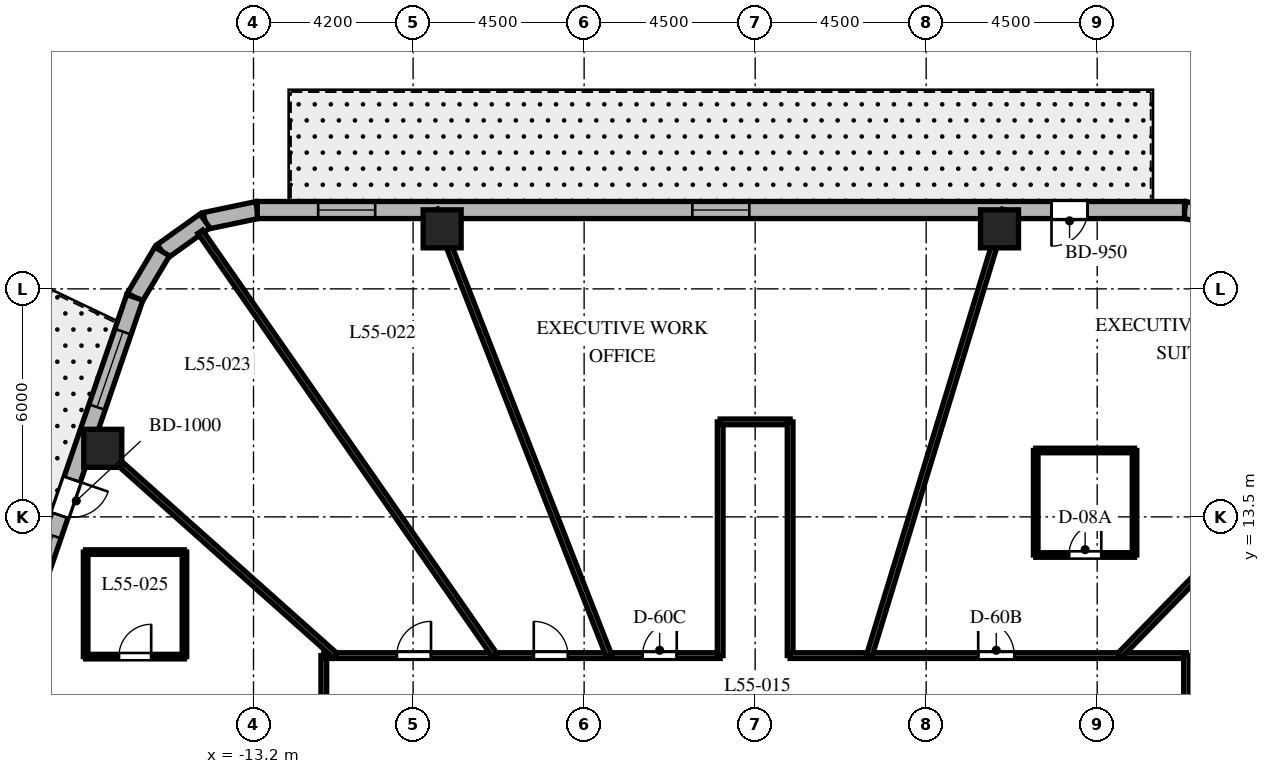
"""IFC4 building model, lengths in metres.
Left out: names, types, materials, properties, quantities, classifications, styles, units other than length and angle.
Written with IfcOpenShell. Run it as: python <this file> out.ifc"""

import sys

from ifc_helpers import new_model, si_unit, direction, frame, frame_2d, origin, origin_2d, place, context, subcontext, project, spatial, rectangle, extrude, element, fill, save


model = new_model("IFC4")
c1 = context("Model", 3, precision=1e-05, world=origin(), true_north=direction((0.0, 1.0)))
c2 = subcontext(c1, "Body", "Model", "MODEL_VIEW")
j1 = project(units=[si_unit("LENGTHUNIT", "METRE"), si_unit("PLANEANGLEUNIT", "RADIAN")], contexts=[c1])
p1 = place(None, origin())
s1 = spatial("IfcSite", under=j1, at=p1, CompositionType="ELEMENT")
p2 = place(p1, origin())
s2 = spatial("IfcBuilding", under=s1, at=p2, CompositionType="ELEMENT")
p3 = place(p2, frame((0.0, 0.0, 221.7)))
s3 = spatial("IfcBuildingStorey", under=s2, at=p3, CompositionType="ELEMENT", Elevation=221.7)
for number, where, z_axis, x_axis in (
    (1, (6.43, 21.08, 0.0), (0.0, 0.0, 1.0), (1.0, 0.0, 0.0)),
    (2, (-8.236, 21.08, 0.0), (0.0, 0.0, 1.0), (1.0, 0.0, 0.0)),
    (3, (-17.166, 15.304, 0.0), (0.0, 0.0, 1.0), (1.0, 0.0, 0.0)),
):
    element("IfcColumn", number, at=place(p3, frame(where, z_axis=z_axis, x_axis=x_axis)), inside=s3, PredefinedType="COLUMN", context=c2, shape_type="SweptSolid", body=[
        extrude(rectangle(XDim=1.0, YDim=1.0, at=origin_2d()), origin(), (0.0, 0.0, 1.0), 3.8),
    ])
p4 = place(p3, frame((12.546, 21.34, 0.0), z_axis=(0.0, 0.0, 1.0), x_axis=(-0.982686750835, 0.18527479519, 0.0)))
e4 = element("IfcWall", 4, at=p4, inside=s3, PredefinedType="SOLIDWALL", context=c2, shape_type="SweptSolid", body=[
    extrude(rectangle(XDim=1.27, YDim=0.45, at=frame_2d((0.635, 0.0))), origin(), (0.0, 0.0, 1.0), 3.5),
])
p5 = place(p3, frame((-13.102, 21.575, 0.0), z_axis=(0.0, 0.0, 1.0), x_axis=(-0.978757421505, -0.205021730188, 0.0)))
e5 = element("IfcWall", 5, at=p5, inside=s3, PredefinedType="SOLIDWALL", context=c2, shape_type="SweptSolid", body=[
    extrude(rectangle(XDim=1.406, YDim=0.45, at=frame_2d((0.703, 0.0))), origin(), (0.0, 0.0, 1.0), 3.5),
])
p6 = place(p3, frame((-14.478, 21.287, 0.0), z_axis=(0.0, 0.0, 1.0), x_axis=(-0.813888518617, -0.58102106611, 0.0)))
e6 = element("IfcWall", 6, at=p6, inside=s3, PredefinedType="SOLIDWALL", context=c2, shape_type="SweptSolid", body=[
    extrude(rectangle(XDim=1.383, YDim=0.45, at=frame_2d((0.691, 0.0))), origin(), (0.0, 0.0, 1.0), 3.5),
])
p7 = place(p3, frame((-15.604, 20.483, 0.0), z_axis=(0.0, 0.0, 1.0), x_axis=(-0.512222149036, -0.858852996756, 0.0)))
e7 = element("IfcWall", 7, at=p7, inside=s3, PredefinedType="SOLIDWALL", context=c2, shape_type="SweptSolid", body=[
    extrude(rectangle(XDim=1.406, YDim=0.45, at=frame_2d((0.703, 0.0))), origin(), (0.0, 0.0, 1.0), 3.5),
])
p8 = place(p3, frame((11.298, 21.575, 0.0), z_axis=(0.0, 0.0, 1.0), x_axis=(-1.0, 0.0, 0.0)))
e8 = element("IfcWall", 8, at=p8, inside=s3, PredefinedType="SOLIDWALL", context=c2, shape_type="SweptSolid", body=[
    extrude(rectangle(XDim=24.399, YDim=0.45, at=frame_2d((12.2, 0.0))), origin(), (0.0, 0.0, 1.0), 3.5),
])
p9 = place(p8, frame((2.55, 0.0, 0.0)))
e9 = element("IfcOpeningElement", 9, at=p9, cuts=e8, PredefinedType="OPENING", context=c2, shape_type="SweptSolid", body=[
    extrude(rectangle(XDim=0.95, YDim=2.15, at=frame_2d((0.475, 1.075))), frame((0.0, 0.235, 0.0), z_axis=(0.0, -1.0, 0.0), x_axis=(1.0, 0.0, 0.0)), (0.0, 0.0, 1.0), 0.47),
])
p10 = place(p8, frame((11.451, 0.0, 0.8)))
e10 = element("IfcOpeningElement", 10, at=p10, cuts=e8, PredefinedType="OPENING", context=c2, shape_type="SweptSolid", body=[
    extrude(rectangle(XDim=1.5, YDim=1.8, at=frame_2d((0.75, 0.9))), frame((0.0, 0.235, 0.0), z_axis=(0.0, -1.0, 0.0), x_axis=(1.0, 0.0, 0.0)), (0.0, 0.0, 1.0), 0.47),
])
p11 = place(p8, frame((21.296, 0.0, 0.8)))
e11 = element("IfcOpeningElement", 11, at=p11, cuts=e8, PredefinedType="OPENING", context=c2, shape_type="SweptSolid", body=[
    extrude(rectangle(XDim=1.5, YDim=1.8, at=frame_2d((0.75, 0.9))), frame((0.0, 0.235, 0.0), z_axis=(0.0, -1.0, 0.0), x_axis=(1.0, 0.0, 0.0)), (0.0, 0.0, 1.0), 0.47),
])
p12 = place(p3, frame((-16.324, 19.275, 0.0), z_axis=(0.0, 0.0, 1.0), x_axis=(-0.325083142304, -0.945685439557, 0.0)))
e12 = element("IfcWall", 12, at=p12, inside=s3, PredefinedType="SOLIDWALL", context=c2, shape_type="SweptSolid", body=[
    extrude(rectangle(XDim=20.224, YDim=0.45, at=frame_2d((10.112, 0.0))), origin(), (0.0, 0.0, 1.0), 3.5),
])
p13 = place(p12, frame((5.062, 0.0, 0.0)))
e13 = element("IfcOpeningElement", 13, at=p13, cuts=e12, PredefinedType="OPENING", context=c2, shape_type="SweptSolid", body=[
    extrude(rectangle(XDim=1.0, YDim=2.15, at=frame_2d((0.5, 1.075))), frame((0.0, 0.235, 0.0), z_axis=(0.0, -1.0, 0.0), x_axis=(1.0, 0.0, 0.0)), (0.0, 0.0, 1.0), 0.47),
])
p14 = place(p12, frame((0.953, 0.0, 0.8)))
e14 = element("IfcOpeningElement", 14, at=p14, cuts=e12, PredefinedType="OPENING", context=c2, shape_type="SweptSolid", body=[
    extrude(rectangle(XDim=2.1, YDim=1.85, at=frame_2d((1.05, 0.925))), frame((0.0, 0.235, 0.0), z_axis=(0.0, -1.0, 0.0), x_axis=(1.0, 0.0, 0.0)), (0.0, 0.0, 1.0), 0.47),
])
p15 = place(p12, frame((6.629, 0.0, 0.8)))
e15 = element("IfcOpeningElement", 15, at=p15, cuts=e12, PredefinedType="OPENING", context=c2, shape_type="SweptSolid", body=[
    extrude(rectangle(XDim=2.1, YDim=1.85, at=frame_2d((1.05, 0.925))), frame((0.0, 0.235, 0.0), z_axis=(0.0, -1.0, 0.0), x_axis=(1.0, 0.0, 0.0)), (0.0, 0.0, 1.0), 0.47),
])
p16 = place(p12, frame((12.312, 0.0, 0.8)))
e16 = element("IfcOpeningElement", 16, at=p16, cuts=e12, PredefinedType="OPENING", context=c2, shape_type="SweptSolid", body=[
    extrude(rectangle(XDim=2.1, YDim=1.85, at=frame_2d((1.05, 0.925))), frame((0.0, 0.235, 0.0), z_axis=(0.0, -1.0, 0.0), x_axis=(1.0, 0.0, 0.0)), (0.0, 0.0, 1.0), 0.47),
])
p17 = place(p12, frame((17.118, 0.0, 0.8)))
e17 = element("IfcOpeningElement", 17, at=p17, cuts=e12, PredefinedType="OPENING", context=c2, shape_type="SweptSolid", body=[
    extrude(rectangle(XDim=2.1, YDim=1.85, at=frame_2d((1.05, 0.925))), frame((0.0, 0.235, 0.0), z_axis=(0.0, -1.0, 0.0), x_axis=(1.0, 0.0, 0.0)), (0.0, 0.0, 1.0), 0.47),
])
p18 = place(p3, frame((-11.35, 4.4, 0.0), z_axis=(0.0, 0.0, 1.0), x_axis=(0.0, 1.0, 0.0)))
e18 = element("IfcWall", 18, at=p18, inside=s3, PredefinedType="PARTITIONING", context=c2, shape_type="SweptSolid", body=[
    extrude(rectangle(XDim=5.45, YDim=0.15, at=frame_2d((2.725, 0.0))), origin(), (0.0, 0.0, 1.0), 2.99),
])
p19 = place(p18, frame((2.466, 0.0, 0.0)))
e19 = element("IfcOpeningElement", 19, at=p19, cuts=e18, PredefinedType="OPENING", context=c2, shape_type="SweptSolid", body=[
    extrude(rectangle(XDim=0.95, YDim=2.03, at=frame_2d((0.475, 1.015))), frame((0.0, 0.085, 0.0), z_axis=(0.0, -1.0, 0.0), x_axis=(1.0, 0.0, 0.0)), (0.0, 0.0, 1.0), 0.17),
])
p20 = place(p3, frame((-11.35, 9.85, 0.0), z_axis=(0.0, 0.0, 1.0), x_axis=(1.0, 0.0, 0.0)))
e20 = element("IfcWall", 20, at=p20, inside=s3, PredefinedType="PARTITIONING", context=c2, shape_type="SweptSolid", body=[
    extrude(rectangle(XDim=10.43, YDim=0.15, at=frame_2d((5.215, 0.0))), origin(), (0.0, 0.0, 1.0), 2.99),
])
p21 = place(p20, frame((8.387, 0.0, 0.0)))
e21 = element("IfcOpeningElement", 21, at=p21, cuts=e20, PredefinedType="OPENING", context=c2, shape_type="SweptSolid", body=[
    extrude(rectangle(XDim=0.9, YDim=2.03, at=frame_2d((0.45, 1.015))), frame((0.0, 0.085, 0.0), z_axis=(0.0, -1.0, 0.0), x_axis=(1.0, 0.0, 0.0)), (0.0, 0.0, 1.0), 0.17),
])
p22 = place(p20, frame((5.525, 0.0, 0.0)))
e22 = element("IfcOpeningElement", 22, at=p22, cuts=e20, PredefinedType="OPENING", context=c2, shape_type="SweptSolid", body=[
    extrude(rectangle(XDim=0.9, YDim=2.03, at=frame_2d((0.45, 1.015))), frame((0.0, 0.085, 0.0), z_axis=(0.0, -1.0, 0.0), x_axis=(1.0, 0.0, 0.0)), (0.0, 0.0, 1.0), 0.17),
])
p23 = place(p20, frame((1.921, 0.0, 0.0)))
e23 = element("IfcOpeningElement", 23, at=p23, cuts=e20, PredefinedType="OPENING", context=c2, shape_type="SweptSolid", body=[
    extrude(rectangle(XDim=0.9, YDim=2.03, at=frame_2d((0.45, 1.015))), frame((0.0, 0.085, 0.0), z_axis=(0.0, -1.0, 0.0), x_axis=(1.0, 0.0, 0.0)), (0.0, 0.0, 1.0), 0.17),
])
p24 = place(p3, frame((-0.92, 9.85, 0.0), z_axis=(0.0, 0.0, 1.0), x_axis=(0.0, 1.0, 0.0)))
e24 = element("IfcWall", 24, at=p24, inside=s3, PredefinedType="PARTITIONING", context=c2, shape_type="SweptSolid", body=[
    extrude(rectangle(XDim=6.15, YDim=0.15, at=frame_2d((3.075, 0.0))), origin(), (0.0, 0.0, 1.0), 3.027),
])
p25 = place(p3, frame((-0.92, 16.0, 0.0), z_axis=(0.0, 0.0, 1.0), x_axis=(1.0, 0.0, 0.0)))
e25 = element("IfcWall", 25, at=p25, inside=s3, PredefinedType="PARTITIONING", context=c2, shape_type="SweptSolid", body=[
    extrude(rectangle(XDim=1.84, YDim=0.15, at=frame_2d((0.92, 0.0))), origin(), (0.0, 0.0, 1.0), 3.5),
])
p26 = place(p3, frame((0.92, 16.0, 0.0), z_axis=(0.0, 0.0, 1.0), x_axis=(0.0, -1.0, 0.0)))
e26 = element("IfcWall", 26, at=p26, inside=s3, PredefinedType="PARTITIONING", context=c2, shape_type="SweptSolid", body=[
    extrude(rectangle(XDim=6.15, YDim=0.15, at=frame_2d((3.075, 0.0))), origin(), (0.0, 0.0, 1.0), 3.027),
])
p27 = place(p3, frame((0.92, 9.85, 0.0), z_axis=(0.0, 0.0, 1.0), x_axis=(1.0, 0.0, 0.0)))
e27 = element("IfcWall", 27, at=p27, inside=s3, PredefinedType="PARTITIONING", context=c2, shape_type="SweptSolid", body=[
    extrude(rectangle(XDim=10.43, YDim=0.15, at=frame_2d((5.215, 0.0))), origin(), (0.0, 0.0, 1.0), 2.99),
])
p28 = place(p27, frame((4.949, 0.0, 0.0)))
e28 = element("IfcOpeningElement", 28, at=p28, cuts=e27, PredefinedType="OPENING", context=c2, shape_type="SweptSolid", body=[
    extrude(rectangle(XDim=0.95, YDim=2.03, at=frame_2d((0.475, 1.015))), frame((0.0, 0.085, 0.0), z_axis=(0.0, -1.0, 0.0), x_axis=(1.0, 0.0, 0.0)), (0.0, 0.0, 1.0), 0.17),
])
p29 = place(p3, frame((11.35, 9.85, 0.0), z_axis=(0.0, 0.0, 1.0), x_axis=(0.0, -1.0, 0.0)))
e29 = element("IfcWall", 29, at=p29, inside=s3, PredefinedType="PARTITIONING", context=c2, shape_type="SweptSolid", body=[
    extrude(rectangle(XDim=12.4, YDim=0.15, at=frame_2d((6.2, 0.0))), origin(), (0.0, 0.0, 1.0), 2.99),
])
p30 = place(p29, frame((4.443, 0.0, 0.0)))
e30 = element("IfcOpeningElement", 30, at=p30, cuts=e29, PredefinedType="OPENING", context=c2, shape_type="SweptSolid", body=[
    extrude(rectangle(XDim=0.95, YDim=2.03, at=frame_2d((0.475, 1.015))), frame((0.0, 0.085, 0.0), z_axis=(0.0, -1.0, 0.0), x_axis=(1.0, 0.0, 0.0)), (0.0, 0.0, 1.0), 0.17),
])
p31 = place(p29, frame((1.242, 0.0, 0.0)))
e31 = element("IfcOpeningElement", 31, at=p31, cuts=e29, PredefinedType="OPENING", context=c2, shape_type="SweptSolid", body=[
    extrude(rectangle(XDim=0.9, YDim=2.03, at=frame_2d((0.45, 1.015))), frame((0.0, 0.085, 0.0), z_axis=(0.0, -1.0, 0.0), x_axis=(1.0, 0.0, 0.0)), (0.0, 0.0, 1.0), 0.17),
])
p32 = place(p29, frame((8.835, 0.0, 0.0)))
e32 = element("IfcOpeningElement", 32, at=p32, cuts=e29, PredefinedType="OPENING", context=c2, shape_type="SweptSolid", body=[
    extrude(rectangle(XDim=0.95, YDim=2.03, at=frame_2d((0.475, 1.015))), frame((0.0, 0.085, 0.0), z_axis=(0.0, -1.0, 0.0), x_axis=(1.0, 0.0, 0.0)), (0.0, 0.0, 1.0), 0.17),
])
p33 = place(p3, frame((11.35, 6.705, 0.0), z_axis=(0.0, 0.0, 1.0), x_axis=(0.86097625004, 0.508645158108, 0.0)))
e33 = element("IfcWall", 33, at=p33, inside=s3, PredefinedType="PARTITIONING", context=c2, shape_type="SweptSolid", body=[
    extrude(rectangle(XDim=8.406, YDim=0.15, at=frame_2d((4.203, 0.0))), origin(), (0.0, 0.0, 1.0), 2.74),
])
p34 = place(p3, frame((9.588, 9.85, 0.0), z_axis=(0.0, 0.0, 1.0), x_axis=(0.697519469595, 0.716565830567, 0.0)))
e34 = element("IfcWall", 34, at=p34, inside=s3, PredefinedType="PARTITIONING", context=c2, shape_type="SweptSolid", body=[
    extrude(rectangle(XDim=9.126, YDim=0.15, at=frame_2d((4.563, 0.0))), origin(), (0.0, 0.0, 1.0), 2.74),
])
p35 = place(p3, frame((3.004, 9.85, 0.0), z_axis=(0.0, 0.0, 1.0), x_axis=(0.291775760688, 0.956486751333, 0.0)))
e35 = element("IfcWall", 35, at=p35, inside=s3, PredefinedType="PARTITIONING", context=c2, shape_type="SweptSolid", body=[
    extrude(rectangle(XDim=12.258, YDim=0.15, at=frame_2d((6.129, 0.0))), origin(), (0.0, 0.0, 1.0), 2.74),
])
p36 = place(p3, frame((-3.848, 9.85, 0.0), z_axis=(0.0, 0.0, 1.0), x_axis=(-0.363921778212, 0.931429513889, 0.0)))
e36 = element("IfcWall", 36, at=p36, inside=s3, PredefinedType="PARTITIONING", context=c2, shape_type="SweptSolid", body=[
    extrude(rectangle(XDim=12.588, YDim=0.15, at=frame_2d((6.294, 0.0))), origin(), (0.0, 0.0, 1.0), 2.74),
])
p37 = place(p3, frame((-6.849, 9.85, 0.0), z_axis=(0.0, 0.0, 1.0), x_axis=(-0.570871709026, 0.821039275451, 0.0)))
e37 = element("IfcWall", 37, at=p37, inside=s3, PredefinedType="PARTITIONING", context=c2, shape_type="SweptSolid", body=[
    extrude(rectangle(XDim=13.582, YDim=0.15, at=frame_2d((6.791, 0.0))), origin(), (0.0, 0.0, 1.0), 2.74),
])
p38 = place(p3, frame((-11.048, 9.85, 0.0), z_axis=(0.0, 0.0, 1.0), x_axis=(-0.746444434655, 0.665447748492, 0.0)))
e38 = element("IfcWall", 38, at=p38, inside=s3, PredefinedType="PARTITIONING", context=c2, shape_type="SweptSolid", body=[
    extrude(rectangle(XDim=8.732, YDim=0.15, at=frame_2d((4.366, 0.0))), origin(), (0.0, 0.0, 1.0), 2.74),
])
p39 = place(p3, frame((-11.35, 5.072, 0.0), z_axis=(0.0, 0.0, 1.0), x_axis=(-0.912980177983, 0.408003914944, 0.0)))
e39 = element("IfcWall", 39, at=p39, inside=s3, PredefinedType="PARTITIONING", context=c2, shape_type="SweptSolid", body=[
    extrude(rectangle(XDim=9.358, YDim=0.15, at=frame_2d((4.679, 0.0))), origin(), (0.0, 0.0, 1.0), 2.74),
])
p40 = place(p3, frame((7.383, 12.497, 0.0), z_axis=(0.0, 0.0, 1.0), x_axis=(1.0, 0.0, 0.0)))
e40 = element("IfcWall", 40, at=p40, inside=s3, PredefinedType="PARTITIONING", context=c2, shape_type="SweptSolid", body=[
    extrude(rectangle(XDim=2.6, YDim=0.12, at=frame_2d((1.3, 0.0))), origin(), (0.0, 0.0, 1.0), 2.94),
])
p41 = place(p40, frame((0.875, 0.0, 0.0)))
e41 = element("IfcOpeningElement", 41, at=p41, cuts=e40, PredefinedType="OPENING", context=c2, shape_type="SweptSolid", body=[
    extrude(rectangle(XDim=0.85, YDim=2.03, at=frame_2d((0.425, 1.015))), frame((0.0, 0.07, 0.0), z_axis=(0.0, -1.0, 0.0), x_axis=(1.0, 0.0, 0.0)), (0.0, 0.0, 1.0), 0.14),
])
p42 = place(p3, frame((9.983, 12.497, 0.0), z_axis=(0.0, 0.0, 1.0), x_axis=(0.0, 1.0, 0.0)))
e42 = element("IfcWall", 42, at=p42, inside=s3, PredefinedType="PARTITIONING", context=c2, shape_type="SweptSolid", body=[
    extrude(rectangle(XDim=2.75, YDim=0.12, at=frame_2d((1.375, 0.0))), origin(), (0.0, 0.0, 1.0), 3.073),
])
p43 = place(p3, frame((9.983, 15.247, 0.0), z_axis=(0.0, 0.0, 1.0), x_axis=(-1.0, 0.0, 0.0)))
e43 = element("IfcWall", 43, at=p43, inside=s3, PredefinedType="PARTITIONING", context=c2, shape_type="SweptSolid", body=[
    extrude(rectangle(XDim=2.6, YDim=0.12, at=frame_2d((1.3, 0.0))), origin(), (0.0, 0.0, 1.0), 3.073),
])
p44 = place(p3, frame((7.383, 15.247, 0.0), z_axis=(0.0, 0.0, 1.0), x_axis=(0.0, -1.0, 0.0)))
e44 = element("IfcWall", 44, at=p44, inside=s3, PredefinedType="PARTITIONING", context=c2, shape_type="SweptSolid", body=[
    extrude(rectangle(XDim=2.75, YDim=0.12, at=frame_2d((1.375, 0.0))), origin(), (0.0, 0.0, 1.0), 2.94),
])
p45 = place(p3, frame((-17.617, 9.823, 0.0), z_axis=(0.0, 0.0, 1.0), x_axis=(1.0, 0.0, 0.0)))
e45 = element("IfcWall", 45, at=p45, inside=s3, PredefinedType="PARTITIONING", context=c2, shape_type="SweptSolid", body=[
    extrude(rectangle(XDim=2.6, YDim=0.12, at=frame_2d((1.3, 0.0))), origin(), (0.0, 0.0, 1.0), 3.073),
])
p46 = place(p45, frame((0.875, 0.0, 0.0)))
e46 = element("IfcOpeningElement", 46, at=p46, cuts=e45, PredefinedType="OPENING", context=c2, shape_type="SweptSolid", body=[
    extrude(rectangle(XDim=0.85, YDim=2.03, at=frame_2d((0.425, 1.015))), frame((0.0, 0.07, 0.0), z_axis=(0.0, -1.0, 0.0), x_axis=(1.0, 0.0, 0.0)), (0.0, 0.0, 1.0), 0.14),
])
p47 = place(p3, frame((-15.017, 9.823, 0.0), z_axis=(0.0, 0.0, 1.0), x_axis=(0.0, 1.0, 0.0)))
e47 = element("IfcWall", 47, at=p47, inside=s3, PredefinedType="PARTITIONING", context=c2, shape_type="SweptSolid", body=[
    extrude(rectangle(XDim=2.75, YDim=0.12, at=frame_2d((1.375, 0.0))), origin(), (0.0, 0.0, 1.0), 3.073),
])
p48 = place(p3, frame((-15.017, 12.573, 0.0), z_axis=(0.0, 0.0, 1.0), x_axis=(-1.0, 0.0, 0.0)))
e48 = element("IfcWall", 48, at=p48, inside=s3, PredefinedType="PARTITIONING", context=c2, shape_type="SweptSolid", body=[
    extrude(rectangle(XDim=2.6, YDim=0.12, at=frame_2d((1.3, 0.0))), origin(), (0.0, 0.0, 1.0), 3.5),
])
p49 = place(p3, frame((-17.617, 12.573, 0.0), z_axis=(0.0, 0.0, 1.0), x_axis=(0.0, -1.0, 0.0)))
e49 = element("IfcWall", 49, at=p49, inside=s3, PredefinedType="PARTITIONING", context=c2, shape_type="SweptSolid", body=[
    extrude(rectangle(XDim=2.75, YDim=0.12, at=frame_2d((1.375, 0.0))), origin(), (0.0, 0.0, 1.0), 3.5),
])
p50 = place(p9, origin())
e50 = element("IfcDoor", 50, at=p50, inside=s3, OperationType="SINGLE_SWING_RIGHT", PredefinedType="DOOR", context=c2, shape_type="SweptSolid", body=[
    extrude(rectangle(XDim=0.95, YDim=2.15, at=frame_2d((0.475, 1.075))), frame((0.0, 0.025, 0.0), z_axis=(0.0, -1.0, 0.0), x_axis=(1.0, 0.0, 0.0)), (0.0, 0.0, 1.0), 0.05),
])
fill(e9, e50)
p51 = place(p10, origin())
e51 = element("IfcWindow", 51, at=p51, inside=s3, PartitioningType="SINGLE_PANEL", PredefinedType="WINDOW", context=c2, shape_type="SweptSolid", body=[
    extrude(rectangle(XDim=1.5, YDim=1.8, at=frame_2d((0.75, 0.9))), frame((0.0, 0.03, 0.0), z_axis=(0.0, -1.0, 0.0), x_axis=(1.0, 0.0, 0.0)), (0.0, 0.0, 1.0), 0.06),
])
fill(e10, e51)
p52 = place(p11, origin())
e52 = element("IfcWindow", 52, at=p52, inside=s3, PartitioningType="SINGLE_PANEL", PredefinedType="WINDOW", context=c2, shape_type="SweptSolid", body=[
    extrude(rectangle(XDim=1.5, YDim=1.8, at=frame_2d((0.75, 0.9))), frame((0.0, 0.03, 0.0), z_axis=(0.0, -1.0, 0.0), x_axis=(1.0, 0.0, 0.0)), (0.0, 0.0, 1.0), 0.06),
])
fill(e11, e52)
p53 = place(p13, origin())
e53 = element("IfcDoor", 53, at=p53, inside=s3, OperationType="SINGLE_SWING_LEFT", PredefinedType="DOOR", context=c2, shape_type="SweptSolid", body=[
    extrude(rectangle(XDim=1.0, YDim=2.15, at=frame_2d((0.5, 1.075))), frame((0.0, 0.025, 0.0), z_axis=(0.0, -1.0, 0.0), x_axis=(1.0, 0.0, 0.0)), (0.0, 0.0, 1.0), 0.05),
])
fill(e13, e53)
p54 = place(p14, origin())
e54 = element("IfcWindow", 54, at=p54, inside=s3, PartitioningType="SINGLE_PANEL", PredefinedType="WINDOW", context=c2, shape_type="SweptSolid", body=[
    extrude(rectangle(XDim=2.1, YDim=1.85, at=frame_2d((1.05, 0.925))), frame((0.0, 0.03, 0.0), z_axis=(0.0, -1.0, 0.0), x_axis=(1.0, 0.0, 0.0)), (0.0, 0.0, 1.0), 0.06),
])
fill(e14, e54)
p55 = place(p15, origin())
e55 = element("IfcWindow", 55, at=p55, inside=s3, PartitioningType="SINGLE_PANEL", PredefinedType="WINDOW", context=c2, shape_type="SweptSolid", body=[
    extrude(rectangle(XDim=2.1, YDim=1.85, at=frame_2d((1.05, 0.925))), frame((0.0, 0.03, 0.0), z_axis=(0.0, -1.0, 0.0), x_axis=(1.0, 0.0, 0.0)), (0.0, 0.0, 1.0), 0.06),
])
fill(e15, e55)
p56 = place(p28, origin())
e56 = element("IfcDoor", 56, at=p56, inside=s3, OperationType="SINGLE_SWING_LEFT", PredefinedType="DOOR", context=c2, shape_type="SweptSolid", body=[
    extrude(rectangle(XDim=0.95, YDim=2.03, at=frame_2d((0.475, 1.015))), frame((0.0, 0.025, 0.0), z_axis=(0.0, -1.0, 0.0), x_axis=(1.0, 0.0, 0.0)), (0.0, 0.0, 1.0), 0.05),
])
fill(e28, e56)
p57 = place(p41, origin())
e57 = element("IfcDoor", 57, at=p57, inside=s3, OperationType="SINGLE_SWING_RIGHT", PredefinedType="DOOR", context=c2, shape_type="SweptSolid", body=[
    extrude(rectangle(XDim=0.85, YDim=2.03, at=frame_2d((0.425, 1.015))), frame((0.0, 0.025, 0.0), z_axis=(0.0, -1.0, 0.0), x_axis=(1.0, 0.0, 0.0)), (0.0, 0.0, 1.0), 0.05),
])
fill(e41, e57)
p58 = place(p21, origin())
e58 = element("IfcDoor", 58, at=p58, inside=s3, OperationType="SINGLE_SWING_RIGHT", PredefinedType="DOOR", context=c2, shape_type="SweptSolid", body=[
    extrude(rectangle(XDim=0.9, YDim=2.03, at=frame_2d((0.45, 1.015))), frame((0.0, 0.025, 0.0), z_axis=(0.0, -1.0, 0.0), x_axis=(1.0, 0.0, 0.0)), (0.0, 0.0, 1.0), 0.05),
])
fill(e21, e58)
p59 = place(p22, origin())
e59 = element("IfcDoor", 59, at=p59, inside=s3, OperationType="SINGLE_SWING_LEFT", PredefinedType="DOOR", context=c2, shape_type="SweptSolid", body=[
    extrude(rectangle(XDim=0.9, YDim=2.03, at=frame_2d((0.45, 1.015))), frame((0.0, 0.025, 0.0), z_axis=(0.0, -1.0, 0.0), x_axis=(1.0, 0.0, 0.0)), (0.0, 0.0, 1.0), 0.05),
])
fill(e22, e59)
p60 = place(p23, origin())
e60 = element("IfcDoor", 60, at=p60, inside=s3, OperationType="SINGLE_SWING_RIGHT", PredefinedType="DOOR", context=c2, shape_type="SweptSolid", body=[
    extrude(rectangle(XDim=0.9, YDim=2.03, at=frame_2d((0.45, 1.015))), frame((0.0, 0.025, 0.0), z_axis=(0.0, -1.0, 0.0), x_axis=(1.0, 0.0, 0.0)), (0.0, 0.0, 1.0), 0.05),
])
fill(e23, e60)
p61 = place(p46, origin())
e61 = element("IfcDoor", 61, at=p61, inside=s3, OperationType="SINGLE_SWING_RIGHT", PredefinedType="DOOR", context=c2, shape_type="SweptSolid", body=[
    extrude(rectangle(XDim=0.85, YDim=2.03, at=frame_2d((0.425, 1.015))), frame((0.0, 0.025, 0.0), z_axis=(0.0, -1.0, 0.0), x_axis=(1.0, 0.0, 0.0)), (0.0, 0.0, 1.0), 0.05),
])
fill(e46, e61)
save(model, sys.argv[1])
